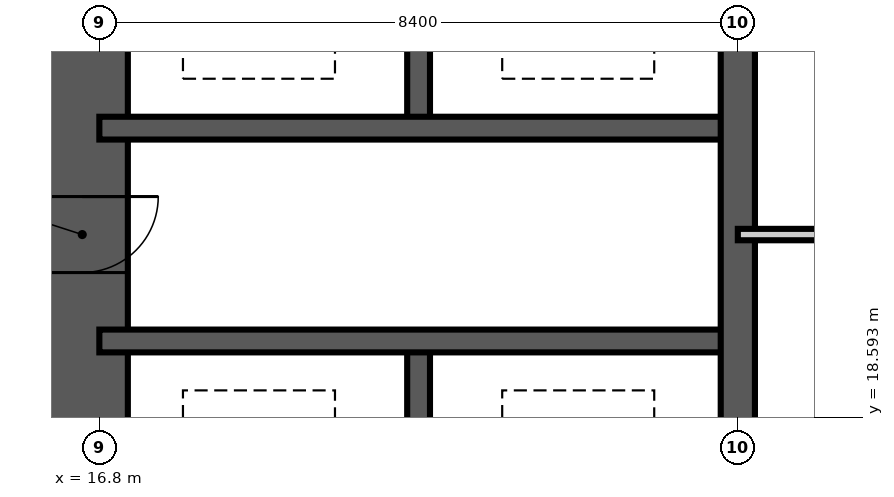
"""IFC4 building model, lengths in metres.
Left out: names, types, materials, properties, quantities, classifications, styles, units other than length and angle.
Written with IfcOpenShell. Run it as: python <this file> out.ifc"""

import sys

from ifc_helpers import new_model, si_unit, direction, frame, frame_2d, origin, place, context, subcontext, project, spatial, rectangle, extrude, element, fill, save


model = new_model("IFC4")
c1 = context("Model", 3, precision=1e-05, world=origin(), true_north=direction((0.0, 1.0)))
c2 = subcontext(c1, "Body", "Model", "MODEL_VIEW")
j1 = project(units=[si_unit("LENGTHUNIT", "METRE"), si_unit("PLANEANGLEUNIT", "RADIAN")], contexts=[c1])
p1 = place(None, origin())
s1 = spatial("IfcSite", under=j1, at=p1, CompositionType="ELEMENT")
p2 = place(p1, origin())
s2 = spatial("IfcBuilding", under=s1, at=p2, CompositionType="ELEMENT")
p3 = place(p2, frame((0.0, 0.0, 111.6)))
s3 = spatial("IfcBuildingStorey", under=s2, at=p3, CompositionType="ELEMENT", Elevation=111.6)
p4 = place(p3, frame((16.575, 41.625, -0.35), z_axis=(0.0, 0.0, 1.0), x_axis=(0.0, -1.0, 0.0)))
e1 = element("IfcWall", 1, at=p4, inside=s3, PredefinedType="SHEAR", context=c2, shape_type="SweptSolid", body=[
    extrude(rectangle(XDim=24.45, YDim=1.2, at=frame_2d((12.225, 0.0))), origin(), (0.0, 0.0, 1.0), 3.6),
])
p5 = place(p4, frame((11.325, 0.0, 0.35)))
e2 = element("IfcOpeningElement", 2, at=p5, cuts=e1, PredefinedType="OPENING", context=c2, shape_type="SweptSolid", body=[
    extrude(rectangle(XDim=1.8, YDim=2.2, at=frame_2d((0.9, 1.1))), frame((0.0, 0.61, 0.0), z_axis=(0.0, -1.0, 0.0), x_axis=(1.0, 0.0, 0.0)), (0.0, 0.0, 1.0), 1.22),
])
p6 = place(p4, frame((20.125, 0.0, 0.35)))
e3 = element("IfcOpeningElement", 3, at=p6, cuts=e1, PredefinedType="OPENING", context=c2, shape_type="SweptSolid", body=[
    extrude(rectangle(XDim=1.0, YDim=2.1, at=frame_2d((0.5, 1.05))), frame((0.0, 0.61, 0.0), z_axis=(0.0, -1.0, 0.0), x_axis=(1.0, 0.0, 0.0)), (0.0, 0.0, 1.0), 1.22),
])
p7 = place(p4, frame((5.425, 0.0, 0.35)))
e4 = element("IfcOpeningElement", 4, at=p7, cuts=e1, PredefinedType="OPENING", context=c2, shape_type="SweptSolid", body=[
    extrude(rectangle(XDim=1.0, YDim=2.1, at=frame_2d((0.5, 1.05))), frame((0.0, 0.61, 0.0), z_axis=(0.0, -1.0, 0.0), x_axis=(1.0, 0.0, 0.0)), (0.0, 0.0, 1.0), 1.22),
])
p8 = place(p3, frame((21.0, 16.8, -0.35), z_axis=(0.0, 0.0, 1.0), x_axis=(0.0, 1.0, 0.0)))
e5 = element("IfcWall", 5, at=p8, inside=s3, PredefinedType="SHEAR", context=c2, shape_type="SweptSolid", body=[
    extrude(rectangle(XDim=2.8, YDim=0.3, at=frame_2d((1.4, 0.0))), origin(), (0.0, 0.0, 1.0), 3.6),
])
p9 = place(p3, frame((21.0, 22.4, -0.35), z_axis=(0.0, 0.0, 1.0), x_axis=(0.0, 1.0, 0.0)))
e6 = element("IfcWall", 6, at=p9, inside=s3, PredefinedType="SHEAR", context=c2, shape_type="SweptSolid", body=[
    extrude(rectangle(XDim=5.6, YDim=0.3, at=frame_2d((2.8, 0.0))), origin(), (0.0, 0.0, 1.0), 3.6),
])
for number, where, z_axis, x_axis in (
    (7, (16.8, 19.6, -0.35), (0.0, 0.0, 1.0), (1.0, 0.0, 0.0)),
    (8, (16.8, 22.4, -0.35), (0.0, 0.0, 1.0), (1.0, 0.0, 0.0)),
):
    element("IfcWall", number, at=place(p3, frame(where, z_axis=z_axis, x_axis=x_axis)), inside=s3, PredefinedType="SHEAR", context=c2, shape_type="SweptSolid", body=[
        extrude(rectangle(XDim=8.4, YDim=0.3, at=frame_2d((4.2, 0.0))), origin(), (0.0, 0.0, 1.0), 3.6),
    ])
p10 = place(p3, frame((25.2, 16.8, -0.35), z_axis=(0.0, 0.0, 1.0), x_axis=(0.0, 1.0, 0.0)))
e9 = element("IfcWall", 9, at=p10, inside=s3, PredefinedType="SHEAR", context=c2, shape_type="SweptSolid", body=[
    extrude(rectangle(XDim=25.2, YDim=0.45, at=frame_2d((12.6, 0.0))), origin(), (0.0, 0.0, 1.0), 3.6),
])
p11 = place(p10, frame((12.1, 0.0, 0.35)))
e10 = element("IfcOpeningElement", 10, at=p11, cuts=e9, PredefinedType="OPENING", context=c2, shape_type="SweptSolid", body=[
    extrude(rectangle(XDim=1.0, YDim=2.1, at=frame_2d((0.5, 1.05))), frame((0.0, 0.235, 0.0), z_axis=(0.0, -1.0, 0.0), x_axis=(1.0, 0.0, 0.0)), (0.0, 0.0, 1.0), 0.47),
])
p12 = place(p3, frame((25.2, 21.0, 0.0), z_axis=(0.0, 0.0, 1.0), x_axis=(1.0, 0.0, 0.0)))
e11 = element("IfcWall", 11, at=p12, inside=s3, PredefinedType="PARTITIONING", context=c2, shape_type="SweptSolid", body=[
    extrude(rectangle(XDim=8.4, YDim=0.15, at=frame_2d((4.2, 0.0))), origin(), (0.0, 0.0, 1.0), 3.25),
])
p13 = place(p12, frame((3.7, 0.0, 0.0)))
e12 = element("IfcOpeningElement", 12, at=p13, cuts=e11, PredefinedType="OPENING", context=c2, shape_type="SweptSolid", body=[
    extrude(rectangle(XDim=1.0, YDim=2.1, at=frame_2d((0.5, 1.05))), frame((0.0, 0.085, 0.0), z_axis=(0.0, -1.0, 0.0), x_axis=(1.0, 0.0, 0.0)), (0.0, 0.0, 1.0), 0.17),
])
p14 = place(p6, origin())
e13 = element("IfcDoor", 13, at=p14, inside=s3, OperationType="SINGLE_SWING_LEFT", PredefinedType="DOOR", context=c2, shape_type="SweptSolid", body=[
    extrude(rectangle(XDim=1.0, YDim=2.1, at=frame_2d((0.5, 1.05))), frame((0.0, 0.025, 0.0), z_axis=(0.0, -1.0, 0.0), x_axis=(1.0, 0.0, 0.0)), (0.0, 0.0, 1.0), 0.05),
])
fill(e3, e13)
save(model, sys.argv[1])
